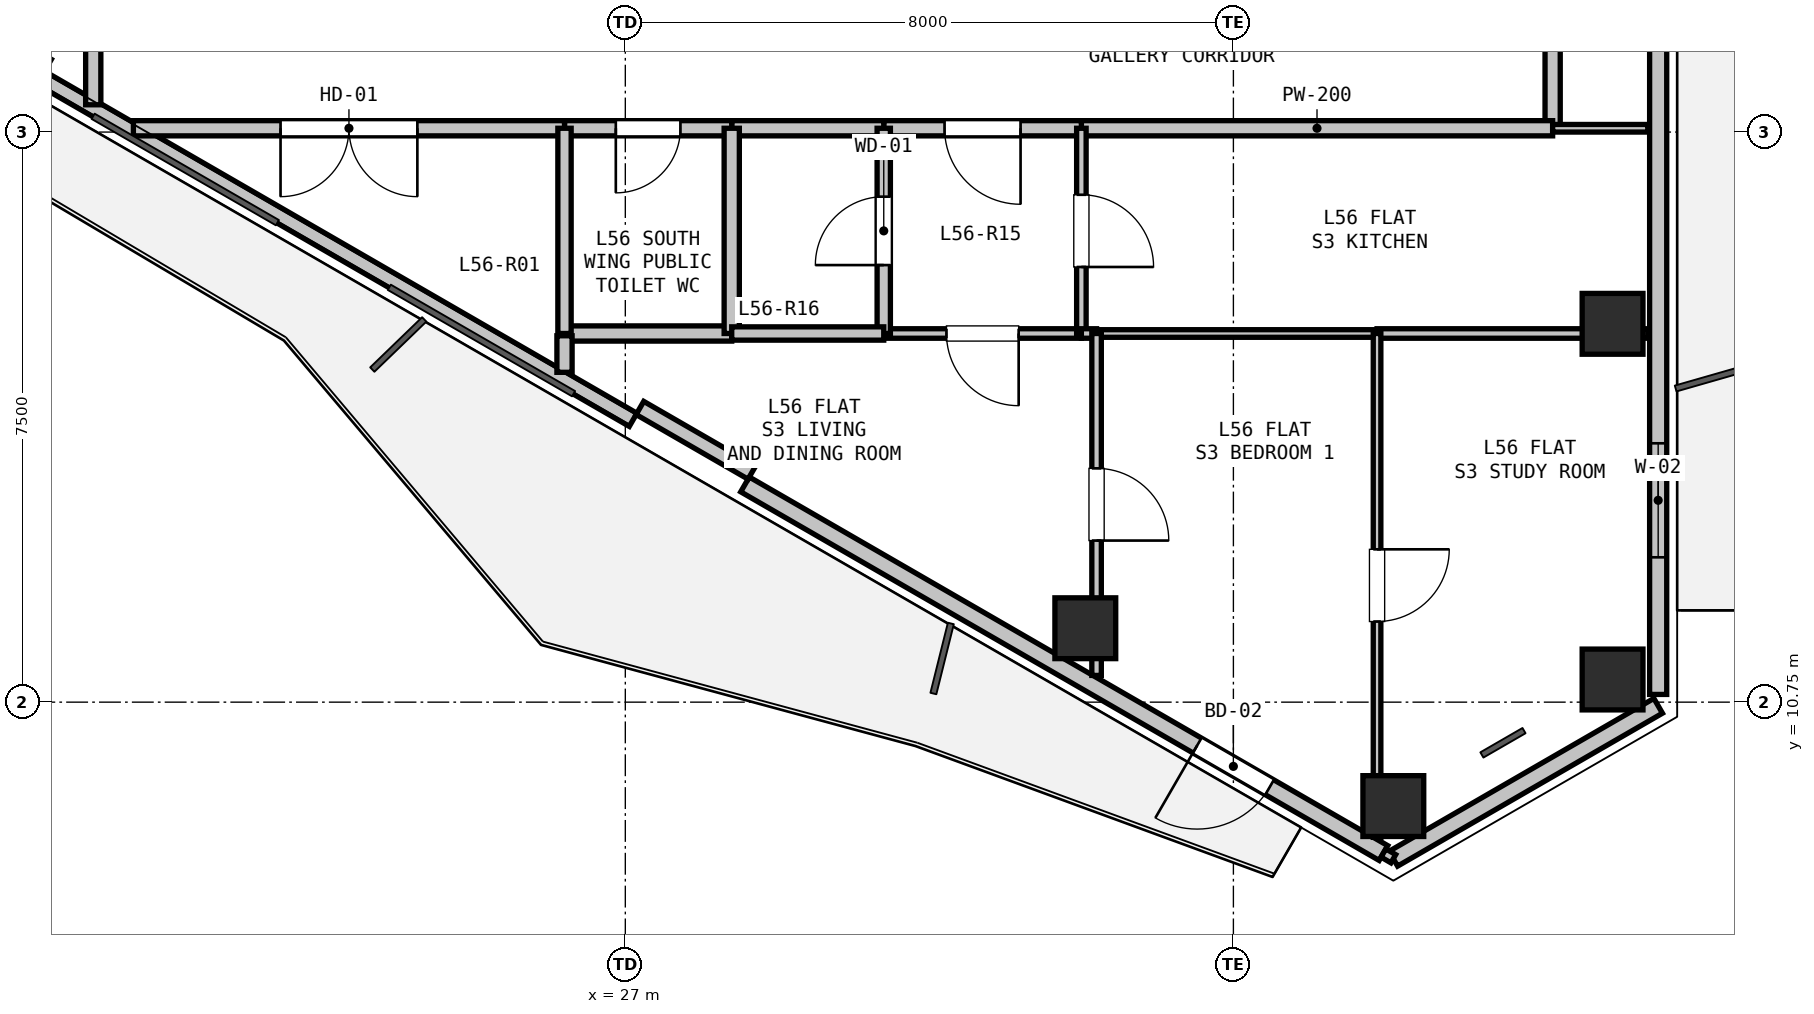
"""IFC4 building model, lengths in metres.
Left out: names, types, materials, properties, quantities, classifications, styles, units other than length and angle.
Written with IfcOpenShell. Run it as: python <this file> out.ifc"""

import sys

from ifc_helpers import new_model, si_unit, direction, frame, frame_2d, origin, origin_2d, place, context, subcontext, project, spatial, rectangle, hollow_rectangle, extrude, element, fill, save


model = new_model("IFC4")
c1 = context("Model", 3, precision=1e-05, world=origin(), true_north=direction((0.0, 1.0)))
c2 = subcontext(c1, "Body", "Model", "MODEL_VIEW")
j1 = project(units=[si_unit("LENGTHUNIT", "METRE"), si_unit("PLANEANGLEUNIT", "RADIAN")], contexts=[c1])
p1 = place(None, origin())
s1 = spatial("IfcSite", under=j1, at=p1, CompositionType="ELEMENT")
p2 = place(p1, origin())
s2 = spatial("IfcBuilding", under=s1, at=p2, CompositionType="ELEMENT")
p3 = place(p2, frame((0.0, 0.0, 201.9)))
s3 = spatial("IfcBuildingStorey", under=s2, at=p3, CompositionType="ELEMENT", Elevation=201.9)
for number, where, z_axis, x_axis in (
    (1, (39.988, 15.727, 0.0), (0.0, 0.0, 1.0), (1.0, 0.0, 0.0)),
    (2, (39.988, 11.048, 0.0), (0.0, 0.0, 1.0), (1.0, 0.0, 0.0)),
    (3, (37.104, 9.383, 0.0), (0.0, 0.0, 1.0), (1.0, 0.0, 0.0)),
    (4, (33.052, 11.722, 0.0), (0.0, 0.0, 1.0), (1.0, 0.0, 0.0)),
):
    element("IfcColumn", number, at=place(p3, frame(where, z_axis=z_axis, x_axis=x_axis)), inside=s3, PredefinedType="COLUMN", context=c2, shape_type="SweptSolid", body=[
        extrude(hollow_rectangle(XDim=0.8, YDim=0.8, WallThickness=0.025, at=origin_2d()), origin(), (0.0, 0.0, 1.0), 3.3),
    ])
p4 = place(p3, frame((40.588, 10.702, 0.0), z_axis=(0.0, 0.0, 1.0), x_axis=(-0.866023907196, -0.500002592159, 0.0)))
e5 = element("IfcWall", 5, at=p4, inside=s3, PredefinedType="SOLIDWALL", context=c2, shape_type="SweptSolid", body=[
    extrude(rectangle(XDim=4.023, YDim=0.225, at=frame_2d((2.012, 0.0))), origin(), (0.0, 0.0, 1.0), 2.69),
])
p5 = place(p3, frame((40.588, 20.551, 0.0), z_axis=(0.0, 0.0, 1.0), x_axis=(0.0, -1.0, 0.0)))
e6 = element("IfcWall", 6, at=p5, inside=s3, PredefinedType="SOLIDWALL", context=c2, shape_type="SweptSolid", body=[
    extrude(rectangle(XDim=9.699, YDim=0.225, at=frame_2d((4.85, 0.0))), origin(), (0.0, 0.0, 1.0), 2.69),
])
p6 = place(p5, frame((6.395, 0.0, 0.9)))
e7 = element("IfcOpeningElement", 7, at=p6, cuts=e6, PredefinedType="OPENING", context=c2, shape_type="SweptSolid", body=[
    extrude(rectangle(XDim=1.5, YDim=1.5, at=frame_2d((0.75, 0.75))), frame((0.0, 0.123, 0.0), z_axis=(0.0, -1.0, 0.0), x_axis=(1.0, 0.0, 0.0)), (0.0, 0.0, 1.0), 0.245),
])
p7 = place(p3, frame((36.974, 8.765, 0.0), z_axis=(0.0, 0.0, 1.0), x_axis=(-0.866016233231, 0.500015883528, 0.0)))
e8 = element("IfcWall", 8, at=p7, inside=s3, PredefinedType="SOLIDWALL", context=c2, shape_type="SweptSolid", body=[
    extrude(rectangle(XDim=9.699, YDim=0.225, at=frame_2d((4.85, 0.0))), origin(), (0.0, 0.0, 1.0), 2.69),
])
p8 = place(p7, frame((1.73, 0.0, 0.0)))
e9 = element("IfcOpeningElement", 9, at=p8, cuts=e8, PredefinedType="OPENING", context=c2, shape_type="SweptSolid", body=[
    extrude(rectangle(XDim=1.1, YDim=2.1, at=frame_2d((0.55, 1.05))), frame((0.0, 0.123, 0.0), z_axis=(0.0, -1.0, 0.0), x_axis=(1.0, 0.0, 0.0)), (0.0, 0.0, 1.0), 0.245),
])
p9 = place(p3, frame((27.102, 14.464, 0.0), z_axis=(0.0, 0.0, 1.0), x_axis=(-0.866020680503, 0.500008180874, 0.0)))
e10 = element("IfcWall", 10, at=p9, inside=s3, PredefinedType="PARAPET", context=c2, shape_type="SweptSolid", body=[
    extrude(rectangle(XDim=8.999, YDim=0.2, at=frame_2d((4.5, 0.0))), origin(), (0.0, 0.0, 1.0), 0.2),
])
p10 = place(p3, frame((28.665, 13.77, 0.0), z_axis=(0.0, 0.0, 1.0), x_axis=(-0.866025371046, 0.500000056704, 0.0)))
e11 = element("IfcWall", 11, at=p10, inside=s3, PredefinedType="PARAPET", context=c2, shape_type="SweptSolid", body=[
    extrude(rectangle(XDim=1.7, YDim=0.2, at=frame_2d((0.85, 0.0))), origin(), (0.0, 0.0, 1.0), 2.69),
])
p11 = place(p3, frame((39.2, 19.9, 0.0), z_axis=(0.0, 0.0, 1.0), x_axis=(0.0, -1.0, 0.0)))
e12 = element("IfcWall", 12, at=p11, inside=s3, PredefinedType="PARTITIONING", context=c2, shape_type="SweptSolid", body=[
    extrude(rectangle(XDim=1.6, YDim=0.2, at=frame_2d((0.8, 0.0))), origin(), (0.0, 0.0, 1.0), 3.07),
])
p12 = place(p3, frame((39.2, 18.3, 0.0), z_axis=(0.0, 0.0, 1.0), x_axis=(-1.0, 0.0, 0.0)))
e13 = element("IfcWall", 13, at=p12, inside=s3, PredefinedType="PARTITIONING", context=c2, shape_type="SweptSolid", body=[
    extrude(rectangle(XDim=6.2, YDim=0.2, at=frame_2d((3.1, 0.0))), origin(), (0.0, 0.0, 1.0), 2.518),
])
p13 = place(p3, frame((33.0, 18.3, 0.0), z_axis=(0.0, 0.0, 1.0), x_axis=(-1.0, 0.0, 0.0)))
e14 = element("IfcWall", 14, at=p13, inside=s3, PredefinedType="PARTITIONING", context=c2, shape_type="SweptSolid", body=[
    extrude(rectangle(XDim=2.6, YDim=0.2, at=frame_2d((1.3, 0.0))), origin(), (0.0, 0.0, 1.0), 3.07),
])
p14 = place(p13, frame((0.8, 0.0, 0.0)))
e15 = element("IfcOpeningElement", 15, at=p14, cuts=e14, PredefinedType="OPENING", context=c2, shape_type="SweptSolid", body=[
    extrude(rectangle(XDim=1.0, YDim=2.15, at=frame_2d((0.5, 1.075))), frame((0.0, 0.11, 0.0), z_axis=(0.0, -1.0, 0.0), x_axis=(1.0, 0.0, 0.0)), (0.0, 0.0, 1.0), 0.22),
])
p15 = place(p3, frame((30.4, 18.3, 0.0), z_axis=(0.0, 0.0, 1.0), x_axis=(-1.0, 0.0, 0.0)))
e16 = element("IfcWall", 16, at=p15, inside=s3, PredefinedType="PARTITIONING", context=c2, shape_type="SweptSolid", body=[
    extrude(rectangle(XDim=2.0, YDim=0.2, at=frame_2d((1.0, 0.0))), origin(), (0.0, 0.0, 1.0), 3.07),
])
p16 = place(p3, frame((28.4, 18.3, 0.0), z_axis=(0.0, 0.0, 1.0), x_axis=(-1.0, 0.0, 0.0)))
e17 = element("IfcWall", 17, at=p16, inside=s3, PredefinedType="PARTITIONING", context=c2, shape_type="SweptSolid", body=[
    extrude(rectangle(XDim=2.2, YDim=0.2, at=frame_2d((1.1, 0.0))), origin(), (0.0, 0.0, 1.0), 3.07),
])
p17 = place(p16, frame((0.675, 0.0, 0.0)))
e18 = element("IfcOpeningElement", 18, at=p17, cuts=e17, PredefinedType="OPENING", context=c2, shape_type="SweptSolid", body=[
    extrude(rectangle(XDim=0.85, YDim=2.1, at=frame_2d((0.425, 1.05))), frame((0.0, 0.11, 0.0), z_axis=(0.0, -1.0, 0.0), x_axis=(1.0, 0.0, 0.0)), (0.0, 0.0, 1.0), 0.22),
])
p18 = place(p3, frame((26.2, 18.3, 0.0), z_axis=(0.0, 0.0, 1.0), x_axis=(-1.0, 0.0, 0.0)))
e19 = element("IfcWall", 19, at=p18, inside=s3, PredefinedType="PARTITIONING", context=c2, shape_type="SweptSolid", body=[
    extrude(rectangle(XDim=5.672, YDim=0.2, at=frame_2d((2.836, 0.0))), origin(), (0.0, 0.0, 1.0), 2.365),
])
p19 = place(p18, frame((1.936, 0.0, 0.0)))
e20 = element("IfcOpeningElement", 20, at=p19, cuts=e19, PredefinedType="OPENING", context=c2, shape_type="SweptSolid", body=[
    extrude(rectangle(XDim=1.8, YDim=2.2, at=frame_2d((0.9, 1.1))), frame((0.0, 0.11, 0.0), z_axis=(0.0, -1.0, 0.0), x_axis=(1.0, 0.0, 0.0)), (0.0, 0.0, 1.0), 0.22),
])
p20 = place(p3, frame((20.0, 18.609, 0.0), z_axis=(0.0, 0.0, 1.0), x_axis=(0.0, 1.0, 0.0)))
e21 = element("IfcWall", 21, at=p20, inside=s3, PredefinedType="PARTITIONING", context=c2, shape_type="SweptSolid", body=[
    extrude(rectangle(XDim=2.141, YDim=0.2, at=frame_2d((1.071, 0.0))), origin(), (0.0, 0.0, 1.0), 2.365),
])
p21 = place(p3, frame((33.0, 15.6, 0.0), z_axis=(0.0, 0.0, 1.0), x_axis=(-1.0, 0.0, 0.0)))
e22 = element("IfcWall", 22, at=p21, inside=s3, PredefinedType="PARTITIONING", context=c2, shape_type="SweptSolid", body=[
    extrude(rectangle(XDim=2.6, YDim=0.125, at=frame_2d((1.3, 0.0))), origin(), (0.0, 0.0, 1.0), 3.07),
])
p22 = place(p21, frame((0.825, 0.0, 0.0)))
e23 = element("IfcOpeningElement", 23, at=p22, cuts=e22, PredefinedType="OPENING", context=c2, shape_type="SweptSolid", body=[
    extrude(rectangle(XDim=0.95, YDim=2.1, at=frame_2d((0.475, 1.05))), frame((0.0, 0.073, 0.0), z_axis=(0.0, -1.0, 0.0), x_axis=(1.0, 0.0, 0.0)), (0.0, 0.0, 1.0), 0.145),
])
p23 = place(p3, frame((30.4, 15.6, 0.0), z_axis=(0.0, 0.0, 1.0), x_axis=(0.0, 1.0, 0.0)))
e24 = element("IfcWall", 24, at=p23, inside=s3, PredefinedType="PLUMBINGWALL", context=c2, shape_type="SweptSolid", body=[
    extrude(rectangle(XDim=2.7, YDim=0.175, at=frame_2d((1.35, 0.0))), origin(), (0.0, 0.0, 1.0), 3.07),
])
p24 = place(p23, frame((0.9, 0.0, 0.0)))
e25 = element("IfcOpeningElement", 25, at=p24, cuts=e24, PredefinedType="OPENING", context=c2, shape_type="SweptSolid", body=[
    extrude(rectangle(XDim=0.9, YDim=2.1, at=frame_2d((0.45, 1.05))), frame((0.0, 0.097, 0.0), z_axis=(0.0, -1.0, 0.0), x_axis=(1.0, 0.0, 0.0)), (0.0, 0.0, 1.0), 0.195),
])
p25 = place(p3, frame((33.0, 18.3, 0.0), z_axis=(0.0, 0.0, 1.0), x_axis=(0.0, -1.0, 0.0)))
e26 = element("IfcWall", 26, at=p25, inside=s3, PredefinedType="PARTITIONING", context=c2, shape_type="SweptSolid", body=[
    extrude(rectangle(XDim=2.7, YDim=0.125, at=frame_2d((1.35, 0.0))), origin(), (0.0, 0.0, 1.0), 3.07),
])
p26 = place(p25, frame((0.875, 0.0, 0.0)))
e27 = element("IfcOpeningElement", 27, at=p26, cuts=e26, PredefinedType="OPENING", context=c2, shape_type="SweptSolid", body=[
    extrude(rectangle(XDim=0.95, YDim=2.1, at=frame_2d((0.475, 1.05))), frame((0.0, 0.073, 0.0), z_axis=(0.0, -1.0, 0.0), x_axis=(1.0, 0.0, 0.0)), (0.0, 0.0, 1.0), 0.145),
])
p27 = place(p3, frame((28.4, 15.6, 0.0), z_axis=(0.0, 0.0, 1.0), x_axis=(-1.0, 0.0, 0.0)))
e28 = element("IfcWall", 28, at=p27, inside=s3, PredefinedType="PARTITIONING", context=c2, shape_type="SweptSolid", body=[
    extrude(rectangle(XDim=2.2, YDim=0.2, at=frame_2d((1.1, 0.0))), origin(), (0.0, 0.0, 1.0), 2.365),
])
p28 = place(p3, frame((26.2, 15.6, 0.0), z_axis=(0.0, 0.0, 1.0), x_axis=(0.0, 1.0, 0.0)))
e29 = element("IfcWall", 29, at=p28, inside=s3, PredefinedType="PLUMBINGWALL", context=c2, shape_type="SweptSolid", body=[
    extrude(rectangle(XDim=2.7, YDim=0.175, at=frame_2d((1.35, 0.0))), origin(), (0.0, 0.0, 1.0), 2.365),
])
p29 = place(p3, frame((28.4, 18.3, 0.0), z_axis=(0.0, 0.0, 1.0), x_axis=(0.0, -1.0, 0.0)))
e30 = element("IfcWall", 30, at=p29, inside=s3, PredefinedType="PARTITIONING", context=c2, shape_type="SweptSolid", body=[
    extrude(rectangle(XDim=2.7, YDim=0.2, at=frame_2d((1.35, 0.0))), origin(), (0.0, 0.0, 1.0), 3.07),
])
p30 = place(p3, frame((30.4, 15.6, 0.0), z_axis=(0.0, 0.0, 1.0), x_axis=(-1.0, 0.0, 0.0)))
e31 = element("IfcWall", 31, at=p30, inside=s3, PredefinedType="PLUMBINGWALL", context=c2, shape_type="SweptSolid", body=[
    extrude(rectangle(XDim=2.0, YDim=0.175, at=frame_2d((1.0, 0.0))), origin(), (0.0, 0.0, 1.0), 3.07),
])
p31 = place(p3, frame((39.2, 18.3, 0.0), z_axis=(0.0, 0.0, 1.0), x_axis=(1.0, 0.0, 0.0)))
e32 = element("IfcWall", 32, at=p31, inside=s3, PredefinedType="PARTITIONING", context=c2, shape_type="SweptSolid", body=[
    extrude(rectangle(XDim=1.252, YDim=0.1, at=frame_2d((0.626, 0.0))), origin(), (0.0, 0.0, 1.0), 2.365),
])
p32 = place(p3, frame((40.452, 15.6, 0.0), z_axis=(0.0, 0.0, 1.0), x_axis=(-1.0, 0.0, 0.0)))
e33 = element("IfcWall", 33, at=p32, inside=s3, PredefinedType="PARTITIONING", context=c2, shape_type="SweptSolid", body=[
    extrude(rectangle(XDim=3.562, YDim=0.125, at=frame_2d((1.781, 0.0))), origin(), (0.0, 0.0, 1.0), 2.518),
])
p33 = place(p3, frame((36.89, 15.6, 0.0), z_axis=(0.0, 0.0, 1.0), x_axis=(-1.0, 0.0, 0.0)))
e34 = element("IfcWall", 34, at=p33, inside=s3, PredefinedType="PARTITIONING", context=c2, shape_type="SweptSolid", body=[
    extrude(rectangle(XDim=3.69, YDim=0.1, at=frame_2d((1.845, 0.0))), origin(), (0.0, 0.0, 1.0), 3.07),
])
p34 = place(p3, frame((33.2, 15.6, 0.0), z_axis=(0.0, 0.0, 1.0), x_axis=(-1.0, 0.0, 0.0)))
e35 = element("IfcWall", 35, at=p34, inside=s3, PredefinedType="PARTITIONING", context=c2, shape_type="SweptSolid", body=[
    extrude(rectangle(XDim=0.2, YDim=0.125, at=frame_2d((0.1, 0.0))), origin(), (0.0, 0.0, 1.0), 3.07),
])
p35 = place(p3, frame((26.2, 15.57, 0.0), z_axis=(0.0, 0.0, 1.0), x_axis=(0.0, -1.0, 0.0)))
e36 = element("IfcWall", 36, at=p35, inside=s3, PredefinedType="PARTITIONING", context=c2, shape_type="SweptSolid", body=[
    extrude(rectangle(XDim=0.481, YDim=0.2, at=frame_2d((0.24, 0.0))), origin(), (0.0, 0.0, 1.0), 2.365),
])
p36 = place(p3, frame((33.2, 15.6, 0.0), z_axis=(0.0, 0.0, 1.0), x_axis=(0.0, -1.0, 0.0)))
e37 = element("IfcWall", 37, at=p36, inside=s3, PredefinedType="PARTITIONING", context=c2, shape_type="SweptSolid", body=[
    extrude(rectangle(XDim=4.499, YDim=0.125, at=frame_2d((2.249, 0.0))), origin(), (0.0, 0.0, 1.0), 3.07),
])
p37 = place(p36, frame((1.774, 0.0, 0.0)))
e38 = element("IfcOpeningElement", 38, at=p37, cuts=e37, PredefinedType="OPENING", context=c2, shape_type="SweptSolid", body=[
    extrude(rectangle(XDim=0.95, YDim=2.1, at=frame_2d((0.475, 1.05))), frame((0.0, 0.073, 0.0), z_axis=(0.0, -1.0, 0.0), x_axis=(1.0, 0.0, 0.0)), (0.0, 0.0, 1.0), 0.145),
])
p38 = place(p3, frame((36.89, 15.6, 0.0), z_axis=(0.0, 0.0, 1.0), x_axis=(0.0, -1.0, 0.0)))
e39 = element("IfcWall", 39, at=p38, inside=s3, PredefinedType="PARTITIONING", context=c2, shape_type="SweptSolid", body=[
    extrude(rectangle(XDim=6.629, YDim=0.1, at=frame_2d((3.314, 0.0))), origin(), (0.0, 0.0, 1.0), 3.07),
])
p39 = place(p38, frame((2.839, 0.0, 0.0)))
e40 = element("IfcOpeningElement", 40, at=p39, cuts=e39, PredefinedType="OPENING", context=c2, shape_type="SweptSolid", body=[
    extrude(rectangle(XDim=0.95, YDim=2.1, at=frame_2d((0.475, 1.05))), frame((0.0, 0.06, 0.0), z_axis=(0.0, -1.0, 0.0), x_axis=(1.0, 0.0, 0.0)), (0.0, 0.0, 1.0), 0.12),
])
p40 = place(p3, frame((37.104, 8.69, 0.0), z_axis=(0.0, 0.0, 1.0), x_axis=(-0.865017048845, 0.50174246901, 0.0)))
e41 = element("IfcWall", 41, at=p40, inside=s3, PredefinedType="PARTITIONING", context=c2, shape_type="SweptSolid", body=[
    extrude(rectangle(XDim=0.15, YDim=0.125, at=frame_2d((0.075, 0.0))), origin(), (0.0, 0.0, 1.0), 3.07),
])
p41 = place(p6, origin())
e42 = element("IfcWindow", 42, at=p41, inside=s3, PartitioningType="SINGLE_PANEL", PredefinedType="WINDOW", context=c2, shape_type="SweptSolid", body=[
    extrude(rectangle(XDim=1.5, YDim=1.5, at=frame_2d((0.75, 0.75))), frame((0.0, 0.03, 0.0), z_axis=(0.0, -1.0, 0.0), x_axis=(1.0, 0.0, 0.0)), (0.0, 0.0, 1.0), 0.06),
])
fill(e7, e42)
p42 = place(p8, origin())
e43 = element("IfcDoor", 43, at=p42, inside=s3, OperationType="SINGLE_SWING_RIGHT", PredefinedType="DOOR", context=c2, shape_type="SweptSolid", body=[
    extrude(rectangle(XDim=1.1, YDim=2.1, at=frame_2d((0.55, 1.05))), frame((0.0, 0.025, 0.0), z_axis=(0.0, -1.0, 0.0), x_axis=(1.0, 0.0, 0.0)), (0.0, 0.0, 1.0), 0.05),
])
fill(e9, e43)
p43 = place(p14, origin())
e44 = element("IfcDoor", 44, at=p43, inside=s3, OperationType="SINGLE_SWING_LEFT", PredefinedType="DOOR", context=c2, shape_type="SweptSolid", body=[
    extrude(rectangle(XDim=1.0, YDim=2.15, at=frame_2d((0.5, 1.075))), frame((0.0, 0.025, 0.0), z_axis=(0.0, -1.0, 0.0), x_axis=(1.0, 0.0, 0.0)), (0.0, 0.0, 1.0), 0.05),
])
fill(e15, e44)
p44 = place(p17, origin())
e45 = element("IfcDoor", 45, at=p44, inside=s3, OperationType="SINGLE_SWING_RIGHT", PredefinedType="DOOR", context=c2, shape_type="SweptSolid", body=[
    extrude(rectangle(XDim=0.85, YDim=2.1, at=frame_2d((0.425, 1.05))), frame((0.0, 0.025, 0.0), z_axis=(0.0, -1.0, 0.0), x_axis=(1.0, 0.0, 0.0)), (0.0, 0.0, 1.0), 0.05),
])
fill(e18, e45)
p45 = place(p19, origin())
e46 = element("IfcDoor", 46, at=p45, inside=s3, OperationType="DOUBLE_DOOR_SINGLE_SWING", PredefinedType="DOOR", context=c2, shape_type="SweptSolid", body=[
    extrude(rectangle(XDim=1.8, YDim=2.2, at=frame_2d((0.9, 1.1))), frame((0.0, 0.025, 0.0), z_axis=(0.0, -1.0, 0.0), x_axis=(1.0, 0.0, 0.0)), (0.0, 0.0, 1.0), 0.05),
])
fill(e20, e46)
p46 = place(p24, origin())
e47 = element("IfcDoor", 47, at=p46, inside=s3, OperationType="SINGLE_SWING_LEFT", PredefinedType="DOOR", context=c2, shape_type="SweptSolid", body=[
    extrude(rectangle(XDim=0.9, YDim=2.1, at=frame_2d((0.45, 1.05))), frame((0.0, 0.025, 0.0), z_axis=(0.0, -1.0, 0.0), x_axis=(1.0, 0.0, 0.0)), (0.0, 0.0, 1.0), 0.05),
])
fill(e25, e47)
p47 = place(p26, origin())
e48 = element("IfcDoor", 48, at=p47, inside=s3, OperationType="SINGLE_SWING_RIGHT", PredefinedType="DOOR", context=c2, shape_type="SweptSolid", body=[
    extrude(rectangle(XDim=0.95, YDim=2.1, at=frame_2d((0.475, 1.05))), frame((0.0, 0.025, 0.0), z_axis=(0.0, -1.0, 0.0), x_axis=(1.0, 0.0, 0.0)), (0.0, 0.0, 1.0), 0.05),
])
fill(e27, e48)
p48 = place(p22, origin())
e49 = element("IfcDoor", 49, at=p48, inside=s3, OperationType="SINGLE_SWING_LEFT", PredefinedType="DOOR", context=c2, shape_type="SweptSolid", body=[
    extrude(rectangle(XDim=0.95, YDim=2.1, at=frame_2d((0.475, 1.05))), frame((0.0, 0.025, 0.0), z_axis=(0.0, -1.0, 0.0), x_axis=(1.0, 0.0, 0.0)), (0.0, 0.0, 1.0), 0.05),
])
fill(e23, e49)
p49 = place(p37, origin())
e50 = element("IfcDoor", 50, at=p49, inside=s3, OperationType="SINGLE_SWING_RIGHT", PredefinedType="DOOR", context=c2, shape_type="SweptSolid", body=[
    extrude(rectangle(XDim=0.95, YDim=2.1, at=frame_2d((0.475, 1.05))), frame((0.0, 0.025, 0.0), z_axis=(0.0, -1.0, 0.0), x_axis=(1.0, 0.0, 0.0)), (0.0, 0.0, 1.0), 0.05),
])
fill(e38, e50)
p50 = place(p39, origin())
e51 = element("IfcDoor", 51, at=p50, inside=s3, OperationType="SINGLE_SWING_LEFT", PredefinedType="DOOR", context=c2, shape_type="SweptSolid", body=[
    extrude(rectangle(XDim=0.95, YDim=2.1, at=frame_2d((0.475, 1.05))), frame((0.0, 0.025, 0.0), z_axis=(0.0, -1.0, 0.0), x_axis=(1.0, 0.0, 0.0)), (0.0, 0.0, 1.0), 0.05),
])
fill(e40, e51)
save(model, sys.argv[1])
